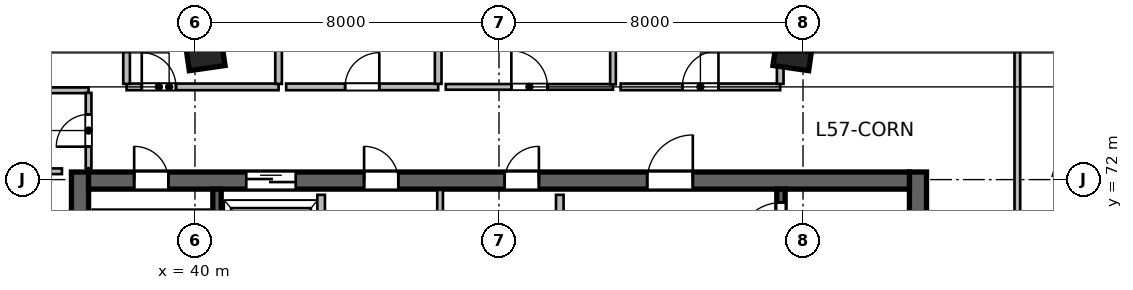
"""IFC4 building model, lengths in metres.
Left out: names, types, materials, properties, quantities, classifications, styles, units other than length and angle.
Written with IfcOpenShell. Run it as: python <this file> out.ifc"""

import sys

from ifc_helpers import new_model, si_unit, direction, frame, frame_2d, origin, origin_2d, place, context, subcontext, project, spatial, rectangle, extrude, source, transform, mapped, element, fill, save


model = new_model("IFC4")
c1 = context("Model", 3, precision=1e-05, world=origin(), true_north=direction((0.0, 1.0)))
c2 = subcontext(c1, "Body", "Model", "MODEL_VIEW")
j1 = project(units=[si_unit("LENGTHUNIT", "METRE"), si_unit("PLANEANGLEUNIT", "RADIAN")], contexts=[c1])
p1 = place(None, origin())
s1 = spatial("IfcSite", under=j1, at=p1, CompositionType="ELEMENT")
p2 = place(p1, origin())
s2 = spatial("IfcBuilding", under=s1, at=p2, CompositionType="ELEMENT")
p3 = place(p2, frame((0.0, 0.0, 235.2)))
s3 = spatial("IfcBuildingStorey", under=s2, at=p3, CompositionType="ELEMENT", Elevation=235.2)
m1 = source(origin(), c2, "Body", "SweptSolid", [
    extrude(rectangle(XDim=12.0, YDim=0.45, at=frame_2d((6.0, 0.0))), origin(), (0.0, 0.0, 1.0), 3.9),
])
for number, where, z_axis, x_axis in (
    (1, (36.975, 60.2, 0.0), (0.0, 0.0, 1.0), (0.0, 1.0, 0.0)),
    (2, (59.025, 60.2, 0.0), (0.0, 0.0, 1.0), (0.0, 1.0, 0.0)),
):
    element("IfcWall", number, at=place(p3, frame(where, z_axis=z_axis, x_axis=x_axis)), inside=s3, PredefinedType="SHEAR", context=c2, shape_type="MappedRepresentation", body=[
        mapped(m1, transform((0.0, 0.0, 0.0), scale=1.0)),
    ])
m2 = source(origin(), c2, "Body", "SweptSolid", [
    extrude(rectangle(XDim=21.6, YDim=0.45, at=frame_2d((10.8, 0.0))), origin(), (0.0, 0.0, 1.0), 3.9),
])
p4 = place(p3, frame((37.2, 71.975, 0.0), z_axis=(0.0, 0.0, 1.0), x_axis=(1.0, 0.0, 0.0)))
e3 = element("IfcWall", 3, at=p4, inside=s3, PredefinedType="SHEAR", context=c2, shape_type="MappedRepresentation", body=[
    mapped(m2, transform((0.0, 0.0, 0.0), scale=1.0)),
])
p5 = place(p4, frame((1.2, 0.0, 0.0)))
e4 = element("IfcOpeningElement", 4, at=p5, cuts=e3, PredefinedType="OPENING", context=c2, shape_type="SweptSolid", body=[
    extrude(rectangle(XDim=0.9, YDim=2.1, at=frame_2d((0.45, 1.05))), frame((0.0, 0.235, 0.0), z_axis=(0.0, -1.0, 0.0), x_axis=(1.0, 0.0, 0.0)), (0.0, 0.0, 1.0), 0.47),
])
p6 = place(p4, frame((14.7, 0.0, 0.0)))
e5 = element("IfcOpeningElement", 5, at=p6, cuts=e3, PredefinedType="OPENING", context=c2, shape_type="SweptSolid", body=[
    extrude(rectangle(XDim=1.2, YDim=2.15, at=frame_2d((0.6, 1.075))), frame((0.0, 0.235, 0.0), z_axis=(0.0, -1.0, 0.0), x_axis=(1.0, 0.0, 0.0)), (0.0, 0.0, 1.0), 0.47),
])
p7 = place(p4, frame((4.15, 0.0, 0.0)))
e6 = element("IfcOpeningElement", 6, at=p7, cuts=e3, PredefinedType="OPENING", context=c2, shape_type="SweptSolid", body=[
    extrude(rectangle(XDim=1.3, YDim=2.15, at=frame_2d((0.65, 1.075))), frame((0.0, 0.235, 0.0), z_axis=(0.0, -1.0, 0.0), x_axis=(1.0, 0.0, 0.0)), (0.0, 0.0, 1.0), 0.47),
])
p8 = place(p4, frame((7.25, 0.0, 0.0)))
e7 = element("IfcOpeningElement", 7, at=p8, cuts=e3, PredefinedType="OPENING", context=c2, shape_type="SweptSolid", body=[
    extrude(rectangle(XDim=0.9, YDim=2.1, at=frame_2d((0.45, 1.05))), frame((0.0, 0.235, 0.0), z_axis=(0.0, -1.0, 0.0), x_axis=(1.0, 0.0, 0.0)), (0.0, 0.0, 1.0), 0.47),
])
p9 = place(p4, frame((10.95, 0.0, 0.0)))
e8 = element("IfcOpeningElement", 8, at=p9, cuts=e3, PredefinedType="OPENING", context=c2, shape_type="SweptSolid", body=[
    extrude(rectangle(XDim=0.9, YDim=2.1, at=frame_2d((0.45, 1.05))), frame((0.0, 0.235, 0.0), z_axis=(0.0, -1.0, 0.0), x_axis=(1.0, 0.0, 0.0)), (0.0, 0.0, 1.0), 0.47),
])
m3 = source(origin(), c2, "Body", "SweptSolid", [
    extrude(rectangle(XDim=11.1, YDim=0.22, at=frame_2d((5.55, 0.0))), origin(), (0.0, 0.0, 1.0), 3.9),
])
p10 = place(p3, frame((40.58, 60.65, 0.0), z_axis=(0.0, 0.0, 1.0), x_axis=(0.0, 1.0, 0.0)))
e9 = element("IfcWall", 9, at=p10, inside=s3, PredefinedType="SHEAR", context=c2, shape_type="MappedRepresentation", body=[
    mapped(m3, transform((0.0, 0.0, 0.0), scale=1.0)),
])
p11 = place(p3, frame((55.42, 60.65, 0.0), z_axis=(0.0, 0.0, 1.0), x_axis=(0.0, 1.0, 0.0)))
e10 = element("IfcWall", 10, at=p11, inside=s3, PredefinedType="SHEAR", context=c2, shape_type="MappedRepresentation", body=[
    mapped(m3, transform((0.0, 0.0, 0.0), scale=1.0)),
])
p12 = place(p11, frame((9.595, 0.0, 0.0)))
e11 = element("IfcOpeningElement", 11, at=p12, cuts=e10, PredefinedType="OPENING", context=c2, shape_type="SweptSolid", body=[
    extrude(rectangle(XDim=1.15, YDim=2.15, at=frame_2d((0.575, 1.075))), frame((0.0, 0.12, 0.0), z_axis=(0.0, -1.0, 0.0), x_axis=(1.0, 0.0, 0.0)), (0.0, 0.0, 1.0), 0.24),
])
m4 = source(origin(), c2, "Body", "SweptSolid", [
    extrude(rectangle(XDim=0.95, YDim=0.95, at=origin_2d()), origin(), (0.0, 0.0, 1.0), 3.9),
])
for number, where, z_axis, x_axis in (
    (12, (40.253, 75.404, 0.0), (0.0, 0.0, 1.0), (-0.143, 0.99, 0.0)),
    (13, (55.747, 75.404, 0.0), (0.0, 0.0, 1.0), (0.143, 0.99, 0.0)),
):
    element("IfcColumn", number, at=place(p3, frame(where, z_axis=z_axis, x_axis=x_axis)), inside=s3, PredefinedType="COLUMN", context=c2, shape_type="MappedRepresentation", body=[
        mapped(m4, transform((0.0, 0.0, 0.0), scale=1.0)),
    ])
m5 = source(origin(), c2, "Body", "SweptSolid", [
    extrude(rectangle(XDim=5.8, YDim=0.2, at=frame_2d((2.9, 0.0))), origin(), (0.0, 0.0, 1.0), 3.65),
])
p13 = place(p3, frame((49.6, 65.8, 0.0), z_axis=(0.0, 0.0, 1.0), x_axis=(0.0, 1.0, 0.0)))
e14 = element("IfcWall", 14, at=p13, inside=s3, PredefinedType="SOLIDWALL", context=c2, shape_type="MappedRepresentation", body=[
    mapped(m5, transform((0.0, 0.0, 0.0), scale=1.0)),
])
m6 = source(origin(), c2, "Body", "SweptSolid", [
    extrude(rectangle(XDim=3.2, YDim=0.2, at=frame_2d((1.6, 0.0))), origin(), (0.0, 0.0, 1.0), 3.65),
])
p14 = place(p3, frame((43.32, 68.4, 0.0), z_axis=(0.0, 0.0, 1.0), x_axis=(0.0, 1.0, 0.0)))
e15 = element("IfcWall", 15, at=p14, inside=s3, PredefinedType="SOLIDWALL", context=c2, shape_type="MappedRepresentation", body=[
    mapped(m6, transform((0.0, 0.0, 0.0), scale=1.0)),
])
m7 = source(origin(), c2, "Body", "SweptSolid", [
    extrude(rectangle(XDim=3.33, YDim=0.15, at=frame_2d((1.665, 0.0))), origin(), (0.0, 0.0, 1.0), 3.65),
])
p15 = place(p3, frame((46.45, 68.4, 0.0), z_axis=(0.0, 0.0, 1.0), x_axis=(0.0, 1.0, 0.0)))
e16 = element("IfcWall", 16, at=p15, inside=s3, PredefinedType="PARTITIONING", context=c2, shape_type="MappedRepresentation", body=[
    mapped(m7, transform((0.0, 0.0, 0.0), scale=1.0)),
])
m8 = source(origin(), c2, "Body", "SweptSolid", [
    extrude(rectangle(XDim=2.1, YDim=0.15, at=frame_2d((1.05, 0.0))), origin(), (0.0, 0.0, 1.0), 3.65),
])
p16 = place(p3, frame((34.4, 72.22, 0.0), z_axis=(0.0, 0.0, 1.0), x_axis=(1.0, 0.0, 0.0)))
e17 = element("IfcWall", 17, at=p16, inside=s3, PredefinedType="PARTITIONING", context=c2, shape_type="MappedRepresentation", body=[
    mapped(m8, transform((0.0, 0.0, 0.0), scale=1.0)),
])
m9 = source(origin(), c2, "Body", "SweptSolid", [
    extrude(rectangle(XDim=2.8, YDim=0.15, at=frame_2d((1.4, 0.0))), origin(), (0.0, 0.0, 1.0), 3.65),
])
p17 = place(p3, frame((34.4, 74.35, 0.0), z_axis=(0.0, 0.0, 1.0), x_axis=(1.0, 0.0, 0.0)))
e18 = element("IfcWall", 18, at=p17, inside=s3, PredefinedType="PARTITIONING", context=c2, shape_type="MappedRepresentation", body=[
    mapped(m9, transform((0.0, 0.0, 0.0), scale=1.0)),
])
m10 = source(origin(), c2, "Body", "SweptSolid", [
    extrude(rectangle(XDim=1.982, YDim=0.15, at=frame_2d((0.991, 0.0))), origin(), (0.0, 0.0, 1.0), 3.65),
])
p18 = place(p3, frame((37.2, 72.3, 0.0), z_axis=(0.0, 0.0, 1.0), x_axis=(0.0, 1.0, 0.0)))
e19 = element("IfcWall", 19, at=p18, inside=s3, PredefinedType="PARTITIONING", context=c2, shape_type="MappedRepresentation", body=[
    mapped(m10, transform((0.0, 0.0, 0.0), scale=1.0)),
])
p19 = place(p18, frame((0.566, 0.0, 0.0)))
e20 = element("IfcOpeningElement", 20, at=p19, cuts=e19, PredefinedType="OPENING", context=c2, shape_type="SweptSolid", body=[
    extrude(rectangle(XDim=0.85, YDim=2.1, at=frame_2d((0.425, 1.05))), frame((0.0, 0.085, 0.0), z_axis=(0.0, -1.0, 0.0), x_axis=(1.0, 0.0, 0.0)), (0.0, 0.0, 1.0), 0.17),
])
m11 = source(origin(), c2, "Body", "SweptSolid", [
    extrude(rectangle(XDim=4.0, YDim=0.175, at=frame_2d((2.0, 0.0))), origin(), (0.0, 0.0, 1.0), 3.65),
])
p20 = place(p3, frame((38.2, 74.44, 0.0), z_axis=(0.0, 0.0, 1.0), x_axis=(1.0, 0.0, 0.0)))
e21 = element("IfcWall", 21, at=p20, inside=s3, PredefinedType="PARTITIONING", context=c2, shape_type="MappedRepresentation", body=[
    mapped(m11, transform((0.0, 0.0, 0.0), scale=1.0)),
])
p21 = place(p20, frame((0.4, 0.0, 0.0)))
e22 = element("IfcOpeningElement", 22, at=p21, cuts=e21, PredefinedType="OPENING", context=c2, shape_type="SweptSolid", body=[
    extrude(rectangle(XDim=0.9, YDim=2.08, at=frame_2d((0.45, 1.04))), frame((0.0, 0.098, 0.0), z_axis=(0.0, -1.0, 0.0), x_axis=(1.0, 0.0, 0.0)), (0.0, 0.0, 1.0), 0.195),
])
m12 = source(origin(), c2, "Body", "SweptSolid", [
    extrude(rectangle(XDim=2.403, YDim=0.175, at=frame_2d((1.201, 0.0))), origin(), (0.0, 0.0, 1.0), 3.65),
])
for number, where, z_axis, x_axis in (
    (23, (38.2, 74.519, 0.0), (0.0, 0.0, 1.0), (0.0, 1.0, 0.0)),
    (24, (42.2, 74.519, 0.0), (0.0, 0.0, 1.0), (0.0, 1.0, 0.0)),
):
    element("IfcWall", number, at=place(p3, frame(where, z_axis=z_axis, x_axis=x_axis)), inside=s3, PredefinedType="PARTITIONING", context=c2, shape_type="MappedRepresentation", body=[
        mapped(m12, transform((0.0, 0.0, 0.0), scale=1.0)),
    ])
p22 = place(p3, frame((42.4, 74.44, 0.0), z_axis=(0.0, 0.0, 1.0), x_axis=(1.0, 0.0, 0.0)))
e25 = element("IfcWall", 25, at=p22, inside=s3, PredefinedType="PARTITIONING", context=c2, shape_type="MappedRepresentation", body=[
    mapped(m11, transform((0.0, 0.0, 0.0), scale=1.0)),
])
p23 = place(p22, frame((1.55, 0.0, 0.0)))
e26 = element("IfcOpeningElement", 26, at=p23, cuts=e25, PredefinedType="OPENING", context=c2, shape_type="SweptSolid", body=[
    extrude(rectangle(XDim=0.9, YDim=2.08, at=frame_2d((0.45, 1.04))), frame((0.0, 0.098, 0.0), z_axis=(0.0, -1.0, 0.0), x_axis=(1.0, 0.0, 0.0)), (0.0, 0.0, 1.0), 0.195),
])
p24 = place(p3, frame((46.4, 74.519, 0.0), z_axis=(0.0, 0.0, 1.0), x_axis=(0.0, 1.0, 0.0)))
e27 = element("IfcWall", 27, at=p24, inside=s3, PredefinedType="PARTITIONING", context=c2, shape_type="MappedRepresentation", body=[
    mapped(m12, transform((0.0, 0.0, 0.0), scale=1.0)),
])
m13 = source(origin(), c2, "Body", "SweptSolid", [
    extrude(rectangle(XDim=4.4, YDim=0.15, at=frame_2d((2.2, 0.0))), origin(), (0.0, 0.0, 1.0), 3.65),
])
p25 = place(p3, frame((46.6, 74.44, 0.0), z_axis=(0.0, 0.0, 1.0), x_axis=(1.0, 0.0, 0.0)))
e28 = element("IfcWall", 28, at=p25, inside=s3, PredefinedType="PARTITIONING", context=c2, shape_type="MappedRepresentation", body=[
    mapped(m13, transform((0.0, 0.0, 0.0), scale=1.0)),
])
p26 = place(p25, frame((1.725, 0.0, 0.0)))
e29 = element("IfcOpeningElement", 29, at=p26, cuts=e28, PredefinedType="OPENING", context=c2, shape_type="SweptSolid", body=[
    extrude(rectangle(XDim=0.95, YDim=2.1, at=frame_2d((0.475, 1.05))), frame((0.0, 0.085, 0.0), z_axis=(0.0, -1.0, 0.0), x_axis=(1.0, 0.0, 0.0)), (0.0, 0.0, 1.0), 0.17),
])
m14 = source(origin(), c2, "Body", "SweptSolid", [
    extrude(rectangle(XDim=2.425, YDim=0.15, at=frame_2d((1.212, 0.0))), origin(), (0.0, 0.0, 1.0), 3.65),
])
p27 = place(p3, frame((51.0, 74.508, 0.0), z_axis=(0.0, 0.0, 1.0), x_axis=(0.0, 1.0, 0.0)))
e30 = element("IfcWall", 30, at=p27, inside=s3, PredefinedType="PARTITIONING", context=c2, shape_type="MappedRepresentation", body=[
    mapped(m14, transform((0.0, 0.0, 0.0), scale=1.0)),
])
m15 = source(origin(), c2, "Body", "SweptSolid", [
    extrude(rectangle(XDim=4.2, YDim=0.175, at=frame_2d((2.1, 0.0))), origin(), (0.0, 0.0, 1.0), 3.65),
])
p28 = place(p3, frame((51.2, 74.44, 0.0), z_axis=(0.0, 0.0, 1.0), x_axis=(1.0, 0.0, 0.0)))
e31 = element("IfcWall", 31, at=p28, inside=s3, PredefinedType="PARTITIONING", context=c2, shape_type="MappedRepresentation", body=[
    mapped(m15, transform((0.0, 0.0, 0.0), scale=1.0)),
])
p29 = place(p28, frame((1.625, 0.0, 0.0)))
e32 = element("IfcOpeningElement", 32, at=p29, cuts=e31, PredefinedType="OPENING", context=c2, shape_type="SweptSolid", body=[
    extrude(rectangle(XDim=0.95, YDim=2.12, at=frame_2d((0.475, 1.06))), frame((0.0, 0.098, 0.0), z_axis=(0.0, -1.0, 0.0), x_axis=(1.0, 0.0, 0.0)), (0.0, 0.0, 1.0), 0.195),
])
p30 = place(p3, frame((55.4, 74.519, 0.0), z_axis=(0.0, 0.0, 1.0), x_axis=(0.0, 1.0, 0.0)))
e33 = element("IfcWall", 33, at=p30, inside=s3, PredefinedType="PARTITIONING", context=c2, shape_type="MappedRepresentation", body=[
    mapped(m12, transform((0.0, 0.0, 0.0), scale=1.0)),
])
m16 = source(origin(), c2, "Body", "SweptSolid", [
    extrude(rectangle(XDim=13.727, YDim=0.15, at=frame_2d((6.864, 0.0))), origin(), (0.0, 0.0, 1.0), 3.65),
])
p31 = place(p3, frame((61.64, 62.8, 0.0), z_axis=(0.0, 0.0, 1.0), x_axis=(0.0, 1.0, 0.0)))
e34 = element("IfcWall", 34, at=p31, inside=s3, PredefinedType="PARTITIONING", context=c2, shape_type="MappedRepresentation", body=[
    mapped(m16, transform((0.0, 0.0, 0.0), scale=1.0)),
])
p32 = place(p31, frame((4.741, 0.0, 0.0)))
e35 = element("IfcOpeningElement", 35, at=p32, cuts=e34, PredefinedType="OPENING", context=c2, shape_type="SweptSolid", body=[
    extrude(rectangle(XDim=0.95, YDim=2.1, at=frame_2d((0.475, 1.05))), frame((0.0, 0.085, 0.0), z_axis=(0.0, -1.0, 0.0), x_axis=(1.0, 0.0, 0.0)), (0.0, 0.0, 1.0), 0.17),
])
m17 = source(origin(), c2, "Body", "SweptSolid", [
    extrude(rectangle(XDim=0.9, YDim=2.1, at=frame_2d((0.45, 1.05))), frame((0.0, 0.025, 0.0), z_axis=(0.0, -1.0, 0.0), x_axis=(1.0, 0.0, 0.0)), (0.0, 0.0, 1.0), 0.05),
])
p33 = place(p5, origin())
e36 = element("IfcDoor", 36, at=p33, inside=s3, OperationType="SINGLE_SWING_LEFT", PredefinedType="DOOR", context=c2, shape_type="MappedRepresentation", body=[
    mapped(m17, transform((0.0, 0.0, 0.0), scale=1.0)),
])
fill(e4, e36)
m18 = source(origin(), c2, "Body", "SweptSolid", [
    extrude(rectangle(XDim=1.15, YDim=2.15, at=frame_2d((0.575, 1.075))), frame((0.0, 0.025, 0.0), z_axis=(0.0, -1.0, 0.0), x_axis=(1.0, 0.0, 0.0)), (0.0, 0.0, 1.0), 0.05),
])
p34 = place(p12, origin())
e37 = element("IfcDoor", 37, at=p34, inside=s3, OperationType="SINGLE_SWING_LEFT", PredefinedType="DOOR", context=c2, shape_type="MappedRepresentation", body=[
    mapped(m18, transform((0.0, 0.0, 0.0), scale=1.0)),
])
fill(e11, e37)
m19 = source(origin(), c2, "Body", "SweptSolid", [
    extrude(rectangle(XDim=1.2, YDim=2.15, at=frame_2d((0.6, 1.075))), frame((0.0, 0.025, 0.0), z_axis=(0.0, -1.0, 0.0), x_axis=(1.0, 0.0, 0.0)), (0.0, 0.0, 1.0), 0.05),
])
p35 = place(p6, origin())
e38 = element("IfcDoor", 38, at=p35, inside=s3, OperationType="SINGLE_SWING_RIGHT", PredefinedType="DOOR", context=c2, shape_type="MappedRepresentation", body=[
    mapped(m19, transform((0.0, 0.0, 0.0), scale=1.0)),
])
fill(e5, e38)
m20 = source(origin(), c2, "Body", "SweptSolid", [
    extrude(rectangle(XDim=1.3, YDim=2.15, at=frame_2d((0.65, 1.075))), frame((0.0, 0.025, 0.0), z_axis=(0.0, -1.0, 0.0), x_axis=(1.0, 0.0, 0.0)), (0.0, 0.0, 1.0), 0.05),
])
p36 = place(p7, origin())
e39 = element("IfcDoor", 39, at=p36, inside=s3, OperationType="DOUBLE_DOOR_SLIDING", PredefinedType="DOOR", context=c2, shape_type="MappedRepresentation", body=[
    mapped(m20, transform((0.0, 0.0, 0.0), scale=1.0)),
])
fill(e6, e39)
p37 = place(p8, origin())
e40 = element("IfcDoor", 40, at=p37, inside=s3, OperationType="SINGLE_SWING_LEFT", PredefinedType="DOOR", context=c2, shape_type="MappedRepresentation", body=[
    mapped(m17, transform((0.0, 0.0, 0.0), scale=1.0)),
])
fill(e7, e40)
p38 = place(p9, origin())
e41 = element("IfcDoor", 41, at=p38, inside=s3, OperationType="SINGLE_SWING_RIGHT", PredefinedType="DOOR", context=c2, shape_type="MappedRepresentation", body=[
    mapped(m17, transform((0.0, 0.0, 0.0), scale=1.0)),
])
fill(e8, e41)
m21 = source(origin(), c2, "Body", "SweptSolid", [
    extrude(rectangle(XDim=0.85, YDim=2.1, at=frame_2d((0.425, 1.05))), frame((0.0, 0.025, 0.0), z_axis=(0.0, -1.0, 0.0), x_axis=(1.0, 0.0, 0.0)), (0.0, 0.0, 1.0), 0.05),
])
p39 = place(p19, origin())
e42 = element("IfcDoor", 42, at=p39, inside=s3, OperationType="SINGLE_SWING_LEFT", PredefinedType="DOOR", context=c2, shape_type="MappedRepresentation", body=[
    mapped(m21, transform((0.0, 0.0, 0.0), scale=1.0)),
])
fill(e20, e42)
m22 = source(origin(), c2, "Body", "SweptSolid", [
    extrude(rectangle(XDim=0.9, YDim=2.08, at=frame_2d((0.45, 1.04))), frame((0.0, 0.025, 0.0), z_axis=(0.0, -1.0, 0.0), x_axis=(1.0, 0.0, 0.0)), (0.0, 0.0, 1.0), 0.05),
])
p40 = place(p21, origin())
e43 = element("IfcDoor", 43, at=p40, inside=s3, OperationType="SINGLE_SWING_LEFT", PredefinedType="DOOR", context=c2, shape_type="MappedRepresentation", body=[
    mapped(m22, transform((0.0, 0.0, 0.0), scale=1.0)),
])
fill(e22, e43)
p41 = place(p23, origin())
e44 = element("IfcDoor", 44, at=p41, inside=s3, OperationType="SINGLE_SWING_RIGHT", PredefinedType="DOOR", context=c2, shape_type="MappedRepresentation", body=[
    mapped(m22, transform((0.0, 0.0, 0.0), scale=1.0)),
])
fill(e26, e44)
m23 = source(origin(), c2, "Body", "SweptSolid", [
    extrude(rectangle(XDim=0.95, YDim=2.1, at=frame_2d((0.475, 1.05))), frame((0.0, 0.025, 0.0), z_axis=(0.0, -1.0, 0.0), x_axis=(1.0, 0.0, 0.0)), (0.0, 0.0, 1.0), 0.05),
])
p42 = place(p26, origin())
e45 = element("IfcDoor", 45, at=p42, inside=s3, OperationType="SINGLE_SWING_LEFT", PredefinedType="DOOR", context=c2, shape_type="MappedRepresentation", body=[
    mapped(m23, transform((0.0, 0.0, 0.0), scale=1.0)),
])
fill(e29, e45)
m24 = source(origin(), c2, "Body", "SweptSolid", [
    extrude(rectangle(XDim=0.95, YDim=2.12, at=frame_2d((0.475, 1.06))), frame((0.0, 0.025, 0.0), z_axis=(0.0, -1.0, 0.0), x_axis=(1.0, 0.0, 0.0)), (0.0, 0.0, 1.0), 0.05),
])
p43 = place(p29, origin())
e46 = element("IfcDoor", 46, at=p43, inside=s3, OperationType="SINGLE_SWING_RIGHT", PredefinedType="DOOR", context=c2, shape_type="MappedRepresentation", body=[
    mapped(m24, transform((0.0, 0.0, 0.0), scale=1.0)),
])
fill(e32, e46)
save(model, sys.argv[1])
